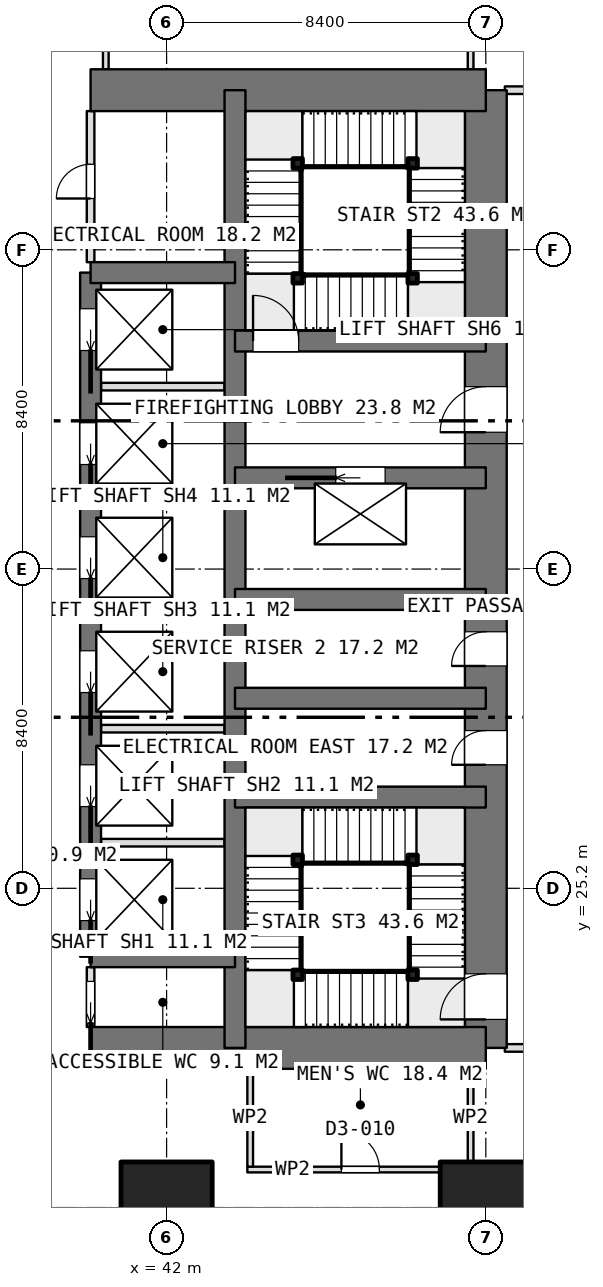
"""IFC4 building model, lengths in metres.
Left out: names, types, materials, properties, quantities, classifications, styles, units other than length and angle.
Written with IfcOpenShell. Run it as: python <this file> out.ifc"""

import sys

from ifc_helpers import new_model, si_unit, direction, frame, frame_2d, origin, origin_2d, place, context, subcontext, project, spatial, rectangle, extrude, element, fill, save


model = new_model("IFC4")
c1 = context("Model", 3, precision=1e-05, world=origin(), true_north=direction((0.0, 1.0)))
c2 = subcontext(c1, "Body", "Model", "MODEL_VIEW")
j1 = project(units=[si_unit("LENGTHUNIT", "METRE"), si_unit("PLANEANGLEUNIT", "RADIAN")], contexts=[c1])
p1 = place(None, origin())
s1 = spatial("IfcSite", under=j1, at=p1, CompositionType="ELEMENT")
p2 = place(p1, origin())
s2 = spatial("IfcBuilding", under=s1, at=p2, CompositionType="ELEMENT")
p3 = place(p2, origin())
s3 = spatial("IfcBuildingStorey", under=s2, at=p3, CompositionType="ELEMENT", Elevation=0.0)
for number, where, z_axis, x_axis in (
    (1, (40.0, 21.0, 0.0), (0.0, 0.0, 1.0), (1.0, 0.0, 0.0)),
    (2, (40.0, 46.2, 0.0), (0.0, 0.0, 1.0), (1.0, 0.0, 0.0)),
):
    element("IfcWall", number, at=place(p3, frame(where, z_axis=z_axis, x_axis=x_axis)), inside=s3, PredefinedType="SHEAR", context=c2, shape_type="SweptSolid", body=[
        extrude(rectangle(XDim=10.4, YDim=1.1, at=frame_2d((5.2, 0.0))), origin(), (0.0, 0.0, 1.0), 5.4),
    ])
p4 = place(p3, frame((50.4, 21.0, 0.0), z_axis=(0.0, 0.0, 1.0), x_axis=(0.0, 1.0, 0.0)))
e3 = element("IfcWall", 3, at=p4, inside=s3, PredefinedType="SHEAR", context=c2, shape_type="SweptSolid", body=[
    extrude(rectangle(XDim=25.2, YDim=1.1, at=frame_2d((12.6, 0.0))), origin(), (0.0, 0.0, 1.0), 5.4),
])
p5 = place(p4, frame((16.2, 0.0, 0.0)))
e4 = element("IfcOpeningElement", 4, at=p5, cuts=e3, PredefinedType="OPENING", context=c2, shape_type="SweptSolid", body=[
    extrude(rectangle(XDim=1.2, YDim=2.1, at=frame_2d((0.6, 1.05))), frame((0.0, 0.56, 0.0), z_axis=(0.0, -1.0, 0.0), x_axis=(1.0, 0.0, 0.0)), (0.0, 0.0, 1.0), 1.12),
])
p6 = place(p4, frame((10.05, 0.0, 0.0)))
e5 = element("IfcOpeningElement", 5, at=p6, cuts=e3, PredefinedType="OPENING", context=c2, shape_type="SweptSolid", body=[
    extrude(rectangle(XDim=0.9, YDim=2.1, at=frame_2d((0.45, 1.05))), frame((0.0, 0.56, 0.0), z_axis=(0.0, -1.0, 0.0), x_axis=(1.0, 0.0, 0.0)), (0.0, 0.0, 1.0), 1.12),
])
p7 = place(p4, frame((7.45, 0.0, 0.0)))
e6 = element("IfcOpeningElement", 6, at=p7, cuts=e3, PredefinedType="OPENING", context=c2, shape_type="SweptSolid", body=[
    extrude(rectangle(XDim=0.9, YDim=2.1, at=frame_2d((0.45, 1.05))), frame((0.0, 0.56, 0.0), z_axis=(0.0, -1.0, 0.0), x_axis=(1.0, 0.0, 0.0)), (0.0, 0.0, 1.0), 1.12),
])
p8 = place(p4, frame((0.75, 0.0, 0.0)))
e7 = element("IfcOpeningElement", 7, at=p8, cuts=e3, PredefinedType="OPENING", context=c2, shape_type="SweptSolid", body=[
    extrude(rectangle(XDim=1.2, YDim=2.1, at=frame_2d((0.6, 1.05))), frame((0.0, 0.56, 0.0), z_axis=(0.0, -1.0, 0.0), x_axis=(1.0, 0.0, 0.0)), (0.0, 0.0, 1.0), 1.12),
])
p9 = place(p3, frame((43.8, 21.0, 0.0), z_axis=(0.0, 0.0, 1.0), x_axis=(0.0, 1.0, 0.0)))
e8 = element("IfcWall", 8, at=p9, inside=s3, PredefinedType="SHEAR", context=c2, shape_type="SweptSolid", body=[
    extrude(rectangle(XDim=25.2, YDim=0.55, at=frame_2d((12.6, 0.0))), origin(), (0.0, 0.0, 1.0), 5.4),
])
p10 = place(p3, frame((40.0, 23.4, 0.0), z_axis=(0.0, 0.0, 1.0), x_axis=(0.0, 1.0, 0.0)))
e9 = element("IfcWall", 9, at=p10, inside=s3, PredefinedType="SHEAR", context=c2, shape_type="SweptSolid", body=[
    extrude(rectangle(XDim=18.0, YDim=0.55, at=frame_2d((9.0, 0.0))), origin(), (0.0, 0.0, 1.0), 5.4),
])
p11 = place(p10, frame((0.95, 0.0, 0.0)))
e10 = element("IfcOpeningElement", 10, at=p11, cuts=e9, PredefinedType="OPENING", context=c2, shape_type="SweptSolid", body=[
    extrude(rectangle(XDim=1.1, YDim=2.1, at=frame_2d((0.55, 1.05))), frame((0.0, 0.285, 0.0), z_axis=(0.0, -1.0, 0.0), x_axis=(1.0, 0.0, 0.0)), (0.0, 0.0, 1.0), 0.57),
])
p12 = place(p10, frame((3.95, 0.0, 0.0)))
e11 = element("IfcOpeningElement", 11, at=p12, cuts=e9, PredefinedType="OPENING", context=c2, shape_type="SweptSolid", body=[
    extrude(rectangle(XDim=1.1, YDim=2.1, at=frame_2d((0.55, 1.05))), frame((0.0, 0.285, 0.0), z_axis=(0.0, -1.0, 0.0), x_axis=(1.0, 0.0, 0.0)), (0.0, 0.0, 1.0), 0.57),
])
p13 = place(p10, frame((6.95, 0.0, 0.0)))
e12 = element("IfcOpeningElement", 12, at=p13, cuts=e9, PredefinedType="OPENING", context=c2, shape_type="SweptSolid", body=[
    extrude(rectangle(XDim=1.1, YDim=2.1, at=frame_2d((0.55, 1.05))), frame((0.0, 0.285, 0.0), z_axis=(0.0, -1.0, 0.0), x_axis=(1.0, 0.0, 0.0)), (0.0, 0.0, 1.0), 0.57),
])
p14 = place(p10, frame((9.95, 0.0, 0.0)))
e13 = element("IfcOpeningElement", 13, at=p14, cuts=e9, PredefinedType="OPENING", context=c2, shape_type="SweptSolid", body=[
    extrude(rectangle(XDim=1.1, YDim=2.1, at=frame_2d((0.55, 1.05))), frame((0.0, 0.285, 0.0), z_axis=(0.0, -1.0, 0.0), x_axis=(1.0, 0.0, 0.0)), (0.0, 0.0, 1.0), 0.57),
])
p15 = place(p10, frame((12.95, 0.0, 0.0)))
e14 = element("IfcOpeningElement", 14, at=p15, cuts=e9, PredefinedType="OPENING", context=c2, shape_type="SweptSolid", body=[
    extrude(rectangle(XDim=1.1, YDim=2.1, at=frame_2d((0.55, 1.05))), frame((0.0, 0.285, 0.0), z_axis=(0.0, -1.0, 0.0), x_axis=(1.0, 0.0, 0.0)), (0.0, 0.0, 1.0), 0.57),
])
p16 = place(p10, frame((15.95, 0.0, 0.0)))
e15 = element("IfcOpeningElement", 15, at=p16, cuts=e9, PredefinedType="OPENING", context=c2, shape_type="SweptSolid", body=[
    extrude(rectangle(XDim=1.1, YDim=2.1, at=frame_2d((0.55, 1.05))), frame((0.0, 0.285, 0.0), z_axis=(0.0, -1.0, 0.0), x_axis=(1.0, 0.0, 0.0)), (0.0, 0.0, 1.0), 0.57),
])
for number, where, z_axis, x_axis in (
    (16, (40.0, 23.4, 0.0), (0.0, 0.0, 1.0), (1.0, 0.0, 0.0)),
    (17, (40.0, 41.4, 0.0), (0.0, 0.0, 1.0), (1.0, 0.0, 0.0)),
):
    element("IfcWall", number, at=place(p3, frame(where, z_axis=z_axis, x_axis=x_axis)), inside=s3, PredefinedType="SHEAR", context=c2, shape_type="SweptSolid", body=[
        extrude(rectangle(XDim=3.8, YDim=0.55, at=frame_2d((1.9, 0.0))), origin(), (0.0, 0.0, 1.0), 5.4),
    ])
for number, where, z_axis, x_axis in (
    (18, (43.8, 27.6, 0.0), (0.0, 0.0, 1.0), (1.0, 0.0, 0.0)),
    (19, (43.8, 30.2, 0.0), (0.0, 0.0, 1.0), (1.0, 0.0, 0.0)),
    (20, (43.8, 32.8, 0.0), (0.0, 0.0, 1.0), (1.0, 0.0, 0.0)),
):
    element("IfcWall", number, at=place(p3, frame(where, z_axis=z_axis, x_axis=x_axis)), inside=s3, PredefinedType="SHEAR", context=c2, shape_type="SweptSolid", body=[
        extrude(rectangle(XDim=6.6, YDim=0.55, at=frame_2d((3.3, 0.0))), origin(), (0.0, 0.0, 1.0), 5.4),
    ])
p17 = place(p3, frame((43.8, 36.0, 0.0), z_axis=(0.0, 0.0, 1.0), x_axis=(1.0, 0.0, 0.0)))
e21 = element("IfcWall", 21, at=p17, inside=s3, PredefinedType="SHEAR", context=c2, shape_type="SweptSolid", body=[
    extrude(rectangle(XDim=6.6, YDim=0.55, at=frame_2d((3.3, 0.0))), origin(), (0.0, 0.0, 1.0), 5.4),
])
p18 = place(p17, frame((2.65, 0.0, 0.0)))
e22 = element("IfcOpeningElement", 22, at=p18, cuts=e21, PredefinedType="OPENING", context=c2, shape_type="SweptSolid", body=[
    extrude(rectangle(XDim=1.3, YDim=2.1, at=frame_2d((0.65, 1.05))), frame((0.0, 0.285, 0.0), z_axis=(0.0, -1.0, 0.0), x_axis=(1.0, 0.0, 0.0)), (0.0, 0.0, 1.0), 0.57),
])
p19 = place(p3, frame((43.8, 39.6, 0.0), z_axis=(0.0, 0.0, 1.0), x_axis=(1.0, 0.0, 0.0)))
e23 = element("IfcWall", 23, at=p19, inside=s3, PredefinedType="SHEAR", context=c2, shape_type="SweptSolid", body=[
    extrude(rectangle(XDim=6.6, YDim=0.55, at=frame_2d((3.3, 0.0))), origin(), (0.0, 0.0, 1.0), 5.4),
])
p20 = place(p19, frame((0.475, 0.0, 0.0)))
e24 = element("IfcOpeningElement", 24, at=p20, cuts=e23, PredefinedType="OPENING", context=c2, shape_type="SweptSolid", body=[
    extrude(rectangle(XDim=1.2, YDim=2.1, at=frame_2d((0.6, 1.05))), frame((0.0, 0.285, 0.0), z_axis=(0.0, -1.0, 0.0), x_axis=(1.0, 0.0, 0.0)), (0.0, 0.0, 1.0), 0.57),
])
for number, where, z_axis, x_axis in (
    (25, (42.0, 16.8, 0.0), (0.0, 0.0, 1.0), (1.0, 0.0, 0.0)),
    (26, (50.4, 16.8, 0.0), (0.0, 0.0, 1.0), (1.0, 0.0, 0.0)),
):
    element("IfcColumn", number, at=place(p3, frame(where, z_axis=z_axis, x_axis=x_axis)), inside=s3, PredefinedType="COLUMN", context=c2, shape_type="SweptSolid", body=[
        extrude(rectangle(XDim=2.4, YDim=2.4, at=origin_2d()), origin(), (0.0, 0.0, 1.0), 5.4),
    ])
for number, where, z_axis, x_axis in (
    (27, (40.275, 26.4, 0.0), (0.0, 0.0, 1.0), (1.0, 0.0, 0.0)),
    (28, (40.275, 29.4, 0.0), (0.0, 0.0, 1.0), (1.0, 0.0, 0.0)),
    (29, (40.275, 32.4, 0.0), (0.0, 0.0, 1.0), (1.0, 0.0, 0.0)),
    (30, (40.275, 35.4, 0.0), (0.0, 0.0, 1.0), (1.0, 0.0, 0.0)),
    (31, (40.275, 38.4, 0.0), (0.0, 0.0, 1.0), (1.0, 0.0, 0.0)),
):
    element("IfcWall", number, at=place(p3, frame(where, z_axis=z_axis, x_axis=x_axis)), inside=s3, PredefinedType="PARTITIONING", context=c2, shape_type="SweptSolid", body=[
        extrude(rectangle(XDim=3.25, YDim=0.2, at=frame_2d((1.625, 0.0))), origin(), (0.0, 0.0, 1.0), 5.1),
    ])
p21 = place(p3, frame((40.0, 21.55, 0.0), z_axis=(0.0, 0.0, 1.0), x_axis=(0.0, 1.0, 0.0)))
e32 = element("IfcWall", 32, at=p21, inside=s3, PredefinedType="PARTITIONING", context=c2, shape_type="SweptSolid", body=[
    extrude(rectangle(XDim=1.575, YDim=0.2, at=frame_2d((0.788, 0.0))), origin(), (0.0, 0.0, 1.0), 5.1),
])
p22 = place(p21, frame((0.1, 0.0, 0.0)))
e33 = element("IfcOpeningElement", 33, at=p22, cuts=e32, PredefinedType="OPENING", context=c2, shape_type="SweptSolid", body=[
    extrude(rectangle(XDim=1.1, YDim=2.1, at=frame_2d((0.55, 1.05))), frame((0.0, 0.11, 0.0), z_axis=(0.0, -1.0, 0.0), x_axis=(1.0, 0.0, 0.0)), (0.0, 0.0, 1.0), 0.22),
])
p23 = place(p3, frame((40.0, 41.675, 0.0), z_axis=(0.0, 0.0, 1.0), x_axis=(0.0, 1.0, 0.0)))
e34 = element("IfcWall", 34, at=p23, inside=s3, PredefinedType="PARTITIONING", context=c2, shape_type="SweptSolid", body=[
    extrude(rectangle(XDim=3.975, YDim=0.2, at=frame_2d((1.987, 0.0))), origin(), (0.0, 0.0, 1.0), 5.1),
])
p24 = place(p23, frame((1.675, 0.0, 0.0)))
e35 = element("IfcOpeningElement", 35, at=p24, cuts=e34, PredefinedType="OPENING", context=c2, shape_type="SweptSolid", body=[
    extrude(rectangle(XDim=0.9, YDim=2.1, at=frame_2d((0.45, 1.05))), frame((0.0, 0.11, 0.0), z_axis=(0.0, -1.0, 0.0), x_axis=(1.0, 0.0, 0.0)), (0.0, 0.0, 1.0), 0.22),
])
for number, where, z_axis, x_axis in (
    (36, (40.4, 46.75, 0.0), (0.0, 0.0, 1.0), (0.0, 1.0, 0.0)),
    (37, (50.0, 46.75, 0.0), (0.0, 0.0, 1.0), (0.0, 1.0, 0.0)),
):
    element("IfcWall", number, at=place(p3, frame(where, z_axis=z_axis, x_axis=x_axis)), inside=s3, PredefinedType="PARTITIONING", context=c2, shape_type="SweptSolid", body=[
        extrude(rectangle(XDim=2.575, YDim=0.15, at=frame_2d((1.288, 0.0))), origin(), (0.0, 0.0, 1.0), 5.1),
    ])
p25 = place(p3, frame((44.125, 17.8, 0.0), z_axis=(0.0, 0.0, 1.0), x_axis=(1.0, 0.0, 0.0)))
e38 = element("IfcWall", 38, at=p25, inside=s3, PredefinedType="PARTITIONING", context=c2, shape_type="SweptSolid", body=[
    extrude(rectangle(XDim=5.95, YDim=0.15, at=frame_2d((2.975, 0.0))), origin(), (0.0, 0.0, 1.0), 5.1),
])
p26 = place(p25, frame((2.475, 0.0, 0.0)))
e39 = element("IfcOpeningElement", 39, at=p26, cuts=e38, PredefinedType="OPENING", context=c2, shape_type="SweptSolid", body=[
    extrude(rectangle(XDim=1.0, YDim=2.1, at=frame_2d((0.5, 1.05))), frame((0.0, 0.085, 0.0), z_axis=(0.0, -1.0, 0.0), x_axis=(1.0, 0.0, 0.0)), (0.0, 0.0, 1.0), 0.17),
])
for number, where, z_axis, x_axis in (
    (40, (44.2, 17.875, 0.0), (0.0, 0.0, 1.0), (0.0, 1.0, 0.0)),
    (41, (50.0, 17.875, 0.0), (0.0, 0.0, 1.0), (0.0, 1.0, 0.0)),
):
    element("IfcWall", number, at=place(p3, frame(where, z_axis=z_axis, x_axis=x_axis)), inside=s3, PredefinedType="PARTITIONING", context=c2, shape_type="SweptSolid", body=[
        extrude(rectangle(XDim=2.575, YDim=0.15, at=frame_2d((1.288, 0.0))), origin(), (0.0, 0.0, 1.0), 5.1),
    ])
p27 = place(p3, frame((54.2, 21.0, 0.0), z_axis=(0.0, 0.0, 1.0), x_axis=(-1.0, 0.0, 0.0)))
e42 = element("IfcWall", 42, at=p27, inside=s3, PredefinedType="PARTITIONING", context=c2, shape_type="SweptSolid", body=[
    extrude(rectangle(XDim=3.3, YDim=0.2, at=frame_2d((1.65, 0.0))), origin(), (0.0, 0.0, 1.0), 5.1),
])
p28 = place(p3, frame((50.9, 46.2, 0.0), z_axis=(0.0, 0.0, 1.0), x_axis=(1.0, 0.0, 0.0)))
e43 = element("IfcWall", 43, at=p28, inside=s3, PredefinedType="PARTITIONING", context=c2, shape_type="SweptSolid", body=[
    extrude(rectangle(XDim=1.1, YDim=0.2, at=frame_2d((0.55, 0.0))), origin(), (0.0, 0.0, 1.0), 5.1),
])
for number, where, z_axis, x_axis in (
    (44, (45.45, 41.25, 0.0), (0.0, 0.0, 1.0), (1.0, 0.0, 0.0)),
    (45, (45.45, 44.275, 0.0), (0.0, 0.0, 1.0), (1.0, 0.0, 0.0)),
    (46, (48.475, 44.275, 0.0), (0.0, 0.0, 1.0), (1.0, 0.0, 0.0)),
    (47, (48.475, 41.25, 0.0), (0.0, 0.0, 1.0), (1.0, 0.0, 0.0)),
    (48, (48.475, 22.925, 0.0), (0.0, 0.0, 1.0), (1.0, 0.0, 0.0)),
    (49, (45.45, 22.925, 0.0), (0.0, 0.0, 1.0), (1.0, 0.0, 0.0)),
    (50, (45.45, 25.95, 0.0), (0.0, 0.0, 1.0), (1.0, 0.0, 0.0)),
    (51, (48.475, 25.95, 0.0), (0.0, 0.0, 1.0), (1.0, 0.0, 0.0)),
):
    element("IfcColumn", number, at=place(p3, frame(where, z_axis=z_axis, x_axis=x_axis)), inside=s3, PredefinedType="COLUMN", context=c2, shape_type="SweptSolid", body=[
        extrude(rectangle(XDim=0.25, YDim=0.25, at=origin_2d()), origin(), (0.0, 0.0, 1.0), 5.4),
    ])
p29 = place(p5, origin())
e52 = element("IfcDoor", 52, at=p29, inside=s3, OperationType="SINGLE_SWING_LEFT", PredefinedType="DOOR", context=c2, shape_type="SweptSolid", body=[
    extrude(rectangle(XDim=1.2, YDim=2.1, at=frame_2d((0.6, 1.05))), frame((0.0, 0.025, 0.0), z_axis=(0.0, -1.0, 0.0), x_axis=(1.0, 0.0, 0.0)), (0.0, 0.0, 1.0), 0.05),
])
fill(e4, e52)
p30 = place(p6, origin())
e53 = element("IfcDoor", 53, at=p30, inside=s3, OperationType="SINGLE_SWING_LEFT", PredefinedType="DOOR", context=c2, shape_type="SweptSolid", body=[
    extrude(rectangle(XDim=0.9, YDim=2.1, at=frame_2d((0.45, 1.05))), frame((0.0, 0.025, 0.0), z_axis=(0.0, -1.0, 0.0), x_axis=(1.0, 0.0, 0.0)), (0.0, 0.0, 1.0), 0.05),
])
fill(e5, e53)
p31 = place(p7, origin())
e54 = element("IfcDoor", 54, at=p31, inside=s3, OperationType="SINGLE_SWING_LEFT", PredefinedType="DOOR", context=c2, shape_type="SweptSolid", body=[
    extrude(rectangle(XDim=0.9, YDim=2.1, at=frame_2d((0.45, 1.05))), frame((0.0, 0.025, 0.0), z_axis=(0.0, -1.0, 0.0), x_axis=(1.0, 0.0, 0.0)), (0.0, 0.0, 1.0), 0.05),
])
fill(e6, e54)
p32 = place(p22, origin())
e55 = element("IfcDoor", 55, at=p32, inside=s3, OperationType="SLIDING_TO_LEFT", PredefinedType="DOOR", context=c2, shape_type="SweptSolid", body=[
    extrude(rectangle(XDim=1.1, YDim=2.1, at=frame_2d((0.55, 1.05))), frame((0.0, 0.025, 0.0), z_axis=(0.0, -1.0, 0.0), x_axis=(1.0, 0.0, 0.0)), (0.0, 0.0, 1.0), 0.05),
])
fill(e33, e55)
p33 = place(p24, origin())
e56 = element("IfcDoor", 56, at=p33, inside=s3, OperationType="SINGLE_SWING_LEFT", PredefinedType="DOOR", context=c2, shape_type="SweptSolid", body=[
    extrude(rectangle(XDim=0.9, YDim=2.1, at=frame_2d((0.45, 1.05))), frame((0.0, 0.025, 0.0), z_axis=(0.0, -1.0, 0.0), x_axis=(1.0, 0.0, 0.0)), (0.0, 0.0, 1.0), 0.05),
])
fill(e35, e56)
p34 = place(p18, origin())
e57 = element("IfcDoor", 57, at=p34, inside=s3, OperationType="SLIDING_TO_LEFT", PredefinedType="USERDEFINED", context=c2, shape_type="SweptSolid", body=[
    extrude(rectangle(XDim=1.3, YDim=2.1, at=frame_2d((0.65, 1.05))), frame((0.0, 0.025, 0.0), z_axis=(0.0, -1.0, 0.0), x_axis=(1.0, 0.0, 0.0)), (0.0, 0.0, 1.0), 0.05),
])
fill(e22, e57)
p35 = place(p11, origin())
e58 = element("IfcDoor", 58, at=p35, inside=s3, OperationType="SLIDING_TO_LEFT", PredefinedType="USERDEFINED", context=c2, shape_type="SweptSolid", body=[
    extrude(rectangle(XDim=1.1, YDim=2.1, at=frame_2d((0.55, 1.05))), frame((0.0, 0.025, 0.0), z_axis=(0.0, -1.0, 0.0), x_axis=(1.0, 0.0, 0.0)), (0.0, 0.0, 1.0), 0.05),
])
fill(e10, e58)
p36 = place(p12, origin())
e59 = element("IfcDoor", 59, at=p36, inside=s3, OperationType="SLIDING_TO_LEFT", PredefinedType="USERDEFINED", context=c2, shape_type="SweptSolid", body=[
    extrude(rectangle(XDim=1.1, YDim=2.1, at=frame_2d((0.55, 1.05))), frame((0.0, 0.025, 0.0), z_axis=(0.0, -1.0, 0.0), x_axis=(1.0, 0.0, 0.0)), (0.0, 0.0, 1.0), 0.05),
])
fill(e11, e59)
p37 = place(p13, origin())
e60 = element("IfcDoor", 60, at=p37, inside=s3, OperationType="SLIDING_TO_LEFT", PredefinedType="USERDEFINED", context=c2, shape_type="SweptSolid", body=[
    extrude(rectangle(XDim=1.1, YDim=2.1, at=frame_2d((0.55, 1.05))), frame((0.0, 0.025, 0.0), z_axis=(0.0, -1.0, 0.0), x_axis=(1.0, 0.0, 0.0)), (0.0, 0.0, 1.0), 0.05),
])
fill(e12, e60)
p38 = place(p14, origin())
e61 = element("IfcDoor", 61, at=p38, inside=s3, OperationType="SLIDING_TO_LEFT", PredefinedType="USERDEFINED", context=c2, shape_type="SweptSolid", body=[
    extrude(rectangle(XDim=1.1, YDim=2.1, at=frame_2d((0.55, 1.05))), frame((0.0, 0.025, 0.0), z_axis=(0.0, -1.0, 0.0), x_axis=(1.0, 0.0, 0.0)), (0.0, 0.0, 1.0), 0.05),
])
fill(e13, e61)
p39 = place(p15, origin())
e62 = element("IfcDoor", 62, at=p39, inside=s3, OperationType="SLIDING_TO_LEFT", PredefinedType="USERDEFINED", context=c2, shape_type="SweptSolid", body=[
    extrude(rectangle(XDim=1.1, YDim=2.1, at=frame_2d((0.55, 1.05))), frame((0.0, 0.025, 0.0), z_axis=(0.0, -1.0, 0.0), x_axis=(1.0, 0.0, 0.0)), (0.0, 0.0, 1.0), 0.05),
])
fill(e14, e62)
p40 = place(p16, origin())
e63 = element("IfcDoor", 63, at=p40, inside=s3, OperationType="SLIDING_TO_LEFT", PredefinedType="USERDEFINED", context=c2, shape_type="SweptSolid", body=[
    extrude(rectangle(XDim=1.1, YDim=2.1, at=frame_2d((0.55, 1.05))), frame((0.0, 0.025, 0.0), z_axis=(0.0, -1.0, 0.0), x_axis=(1.0, 0.0, 0.0)), (0.0, 0.0, 1.0), 0.05),
])
fill(e15, e63)
p41 = place(p26, origin())
e64 = element("IfcDoor", 64, at=p41, inside=s3, OperationType="SINGLE_SWING_LEFT", PredefinedType="DOOR", context=c2, shape_type="SweptSolid", body=[
    extrude(rectangle(XDim=1.0, YDim=2.1, at=frame_2d((0.5, 1.05))), frame((0.0, 0.025, 0.0), z_axis=(0.0, -1.0, 0.0), x_axis=(1.0, 0.0, 0.0)), (0.0, 0.0, 1.0), 0.05),
])
fill(e39, e64)
p42 = place(p20, origin())
e65 = element("IfcDoor", 65, at=p42, inside=s3, OperationType="SINGLE_SWING_RIGHT", PredefinedType="DOOR", context=c2, shape_type="SweptSolid", body=[
    extrude(rectangle(XDim=1.2, YDim=2.1, at=frame_2d((0.6, 1.05))), frame((0.0, 0.025, 0.0), z_axis=(0.0, -1.0, 0.0), x_axis=(1.0, 0.0, 0.0)), (0.0, 0.0, 1.0), 0.05),
])
fill(e24, e65)
p43 = place(p8, origin())
e66 = element("IfcDoor", 66, at=p43, inside=s3, OperationType="SINGLE_SWING_RIGHT", PredefinedType="DOOR", context=c2, shape_type="SweptSolid", body=[
    extrude(rectangle(XDim=1.2, YDim=2.1, at=frame_2d((0.6, 1.05))), frame((0.0, 0.025, 0.0), z_axis=(0.0, -1.0, 0.0), x_axis=(1.0, 0.0, 0.0)), (0.0, 0.0, 1.0), 0.05),
])
fill(e7, e66)
save(model, sys.argv[1])
